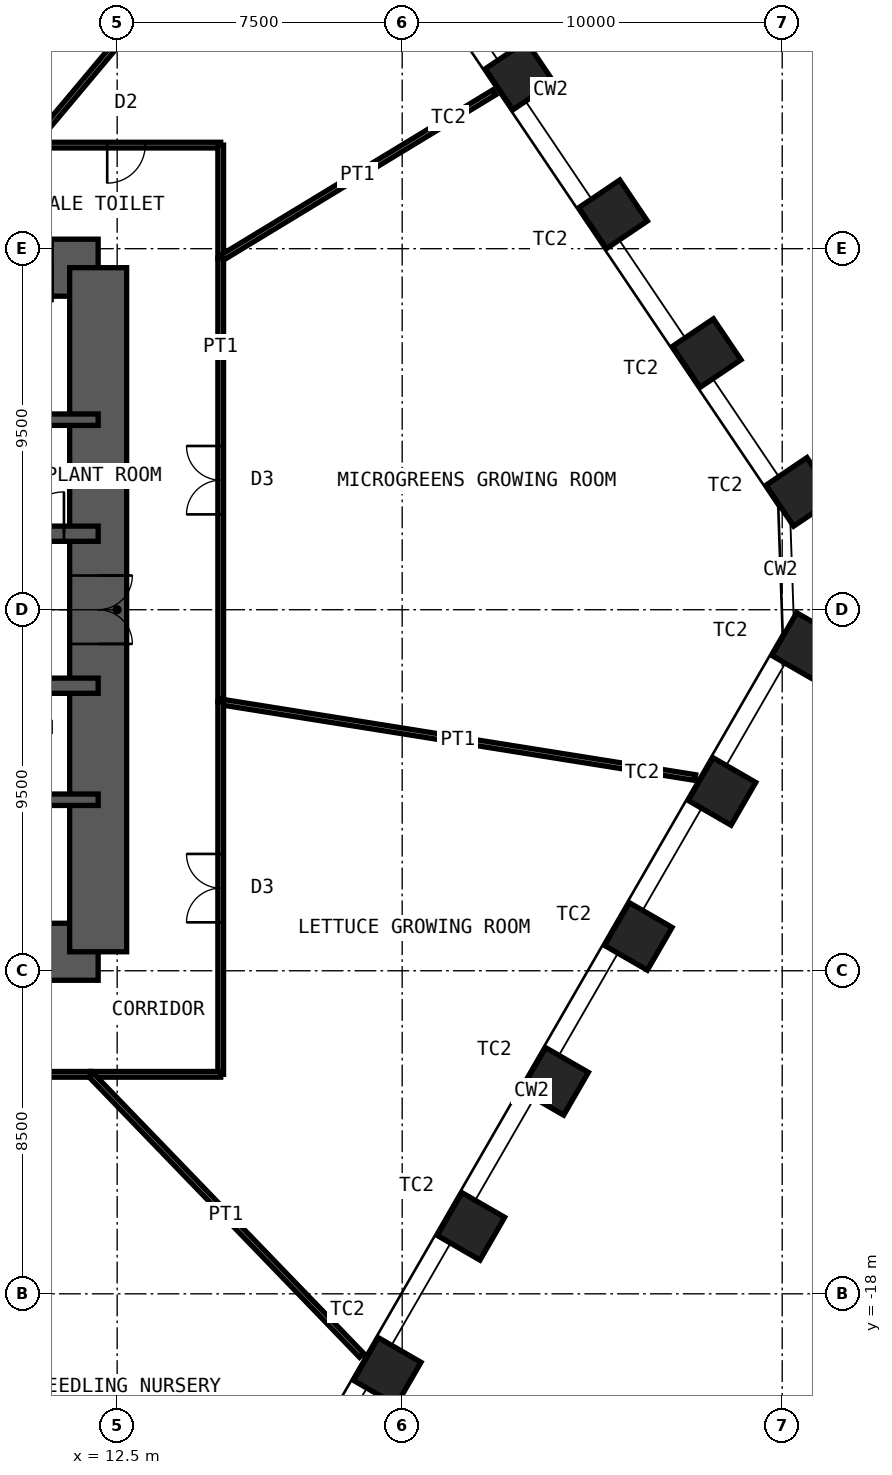
"""IFC4 building model, lengths in metres.
Left out: names, types, materials, properties, quantities, classifications, styles, units other than length and angle.
Written with IfcOpenShell. Run it as: python <this file> out.ifc"""

import sys

from ifc_helpers import new_model, si_unit, direction, frame, frame_2d, origin, origin_2d, place, context, subcontext, project, spatial, rectangle, hollow_rectangle, extrude, element, fill, save


model = new_model("IFC4")
c1 = context("Model", 3, precision=1e-05, world=origin(), true_north=direction((0.0, 1.0)))
c2 = subcontext(c1, "Body", "Model", "MODEL_VIEW")
j1 = project(units=[si_unit("LENGTHUNIT", "METRE"), si_unit("PLANEANGLEUNIT", "RADIAN")], contexts=[c1])
p1 = place(None, origin())
s1 = spatial("IfcSite", under=j1, at=p1, CompositionType="ELEMENT")
p2 = place(p1, origin())
s2 = spatial("IfcBuilding", under=s1, at=p2, CompositionType="ELEMENT")
p3 = place(p2, frame((0.0, 0.0, 87.0)))
s3 = spatial("IfcBuildingStorey", under=s2, at=p3, CompositionType="ELEMENT", Elevation=87.0)
for number, where, z_axis, x_axis in (
    (1, (23.087, 14.056, 0.0), (0.0, 0.0, 1.0), (-0.559, 0.829, 0.0)),
    (2, (25.55, 10.404, 0.0), (0.0, 0.0, 1.0), (-0.559, 0.829, 0.0)),
    (3, (28.013, 6.752, 0.0), (0.0, 0.0, 1.0), (-0.559, 0.829, 0.0)),
    (4, (30.476, 3.101, 0.0), (0.0, 0.0, 1.0), (-0.559, 0.829, 0.0)),
    (5, (30.618, -0.967, 0.0), (0.0, 0.0, 1.0), (0.5, 0.866, 0.0)),
    (6, (28.416, -4.782, 0.0), (0.0, 0.0, 1.0), (0.5, 0.866, 0.0)),
    (7, (26.214, -8.596, 0.0), (0.0, 0.0, 1.0), (0.5, 0.866, 0.0)),
    (8, (24.011, -12.411, 0.0), (0.0, 0.0, 1.0), (0.5, 0.866, 0.0)),
    (9, (21.809, -16.225, 0.0), (0.0, 0.0, 1.0), (0.5, 0.866, 0.0)),
    (10, (19.607, -20.04, 0.0), (0.0, 0.0, 1.0), (0.5, 0.866, 0.0)),
):
    element("IfcColumn", number, at=place(p3, frame(where, z_axis=z_axis, x_axis=x_axis)), inside=s3, PredefinedType="COLUMN", context=c2, shape_type="SweptSolid", body=[
        extrude(hollow_rectangle(XDim=1.3, YDim=1.3, WallThickness=0.1, at=origin_2d()), origin(), (0.0, 0.0, 1.0), 5.0),
    ])
p4 = place(p3, frame((-12.0, 9.0, 0.0), z_axis=(0.0, 0.0, 1.0), x_axis=(1.0, 0.0, 0.0)))
e11 = element("IfcWall", 11, at=p4, inside=s3, PredefinedType="SHEAR", context=c2, shape_type="SweptSolid", body=[
    extrude(rectangle(XDim=24.0, YDim=1.5, at=frame_2d((12.0, 0.0))), origin(), (0.0, 0.0, 1.0), 5.0),
])
p5 = place(p4, frame((10.4, 0.0, 0.0)))
e12 = element("IfcOpeningElement", 12, at=p5, cuts=e11, PredefinedType="OPENING", context=c2, shape_type="SweptSolid", body=[
    extrude(rectangle(XDim=1.0, YDim=2.1, at=frame_2d((0.5, 1.05))), frame((0.0, 0.76, 0.0), z_axis=(0.0, -1.0, 0.0), x_axis=(1.0, 0.0, 0.0)), (0.0, 0.0, 1.0), 1.52),
])
p6 = place(p4, frame((17.6, 0.0, 0.0)))
e13 = element("IfcOpeningElement", 13, at=p6, cuts=e11, PredefinedType="OPENING", context=c2, shape_type="SweptSolid", body=[
    extrude(rectangle(XDim=0.9, YDim=2.1, at=frame_2d((0.45, 1.05))), frame((0.0, 0.76, 0.0), z_axis=(0.0, -1.0, 0.0), x_axis=(1.0, 0.0, 0.0)), (0.0, 0.0, 1.0), 1.52),
])
p7 = place(p4, frame((21.9, 0.0, 0.0)))
e14 = element("IfcOpeningElement", 14, at=p7, cuts=e11, PredefinedType="OPENING", context=c2, shape_type="SweptSolid", body=[
    extrude(rectangle(XDim=0.9, YDim=2.1, at=frame_2d((0.45, 1.05))), frame((0.0, 0.76, 0.0), z_axis=(0.0, -1.0, 0.0), x_axis=(1.0, 0.0, 0.0)), (0.0, 0.0, 1.0), 1.52),
])
p8 = place(p3, frame((-12.0, -9.0, 0.0), z_axis=(0.0, 0.0, 1.0), x_axis=(1.0, 0.0, 0.0)))
e15 = element("IfcWall", 15, at=p8, inside=s3, PredefinedType="SHEAR", context=c2, shape_type="SweptSolid", body=[
    extrude(rectangle(XDim=24.0, YDim=1.5, at=frame_2d((12.0, 0.0))), origin(), (0.0, 0.0, 1.0), 5.0),
])
p9 = place(p8, frame((1.35, 0.0, 0.0)))
e16 = element("IfcOpeningElement", 16, at=p9, cuts=e15, PredefinedType="OPENING", context=c2, shape_type="SweptSolid", body=[
    extrude(rectangle(XDim=1.0, YDim=2.1, at=frame_2d((0.5, 1.05))), frame((0.0, 0.76, 0.0), z_axis=(0.0, -1.0, 0.0), x_axis=(1.0, 0.0, 0.0)), (0.0, 0.0, 1.0), 1.52),
])
p10 = place(p8, frame((5.325, 0.0, 0.0)))
e17 = element("IfcOpeningElement", 17, at=p10, cuts=e15, PredefinedType="OPENING", context=c2, shape_type="SweptSolid", body=[
    extrude(rectangle(XDim=1.15, YDim=2.1, at=frame_2d((0.575, 1.05))), frame((0.0, 0.76, 0.0), z_axis=(0.0, -1.0, 0.0), x_axis=(1.0, 0.0, 0.0)), (0.0, 0.0, 1.0), 1.52),
])
p11 = place(p8, frame((12.6, 0.0, 0.0)))
e18 = element("IfcOpeningElement", 18, at=p11, cuts=e15, PredefinedType="OPENING", context=c2, shape_type="SweptSolid", body=[
    extrude(rectangle(XDim=1.0, YDim=2.1, at=frame_2d((0.5, 1.05))), frame((0.0, 0.76, 0.0), z_axis=(0.0, -1.0, 0.0), x_axis=(1.0, 0.0, 0.0)), (0.0, 0.0, 1.0), 1.52),
])
p12 = place(p3, frame((12.0, -9.0, 0.0), z_axis=(0.0, 0.0, 1.0), x_axis=(0.0, 1.0, 0.0)))
e19 = element("IfcWall", 19, at=p12, inside=s3, PredefinedType="SHEAR", context=c2, shape_type="SweptSolid", body=[
    extrude(rectangle(XDim=18.0, YDim=1.5, at=frame_2d((9.0, 0.0))), origin(), (0.0, 0.0, 1.0), 5.0),
])
p13 = place(p12, frame((8.1, 0.0, 0.0)))
e20 = element("IfcOpeningElement", 20, at=p13, cuts=e19, PredefinedType="OPENING", context=c2, shape_type="SweptSolid", body=[
    extrude(rectangle(XDim=1.8, YDim=2.1, at=frame_2d((0.9, 1.05))), frame((0.0, 0.76, 0.0), z_axis=(0.0, -1.0, 0.0), x_axis=(1.0, 0.0, 0.0)), (0.0, 0.0, 1.0), 1.52),
])
p14 = place(p3, frame((-12.0, 5.0, 0.0), z_axis=(0.0, 0.0, 1.0), x_axis=(1.0, 0.0, 0.0)))
e21 = element("IfcWall", 21, at=p14, inside=s3, PredefinedType="SHEAR", context=c2, shape_type="SweptSolid", body=[
    extrude(rectangle(XDim=24.0, YDim=0.3, at=frame_2d((12.0, 0.0))), origin(), (0.0, 0.0, 1.0), 5.0),
])
p15 = place(p3, frame((-12.0, 2.0, 0.0), z_axis=(0.0, 0.0, 1.0), x_axis=(1.0, 0.0, 0.0)))
e22 = element("IfcWall", 22, at=p15, inside=s3, PredefinedType="SHEAR", context=c2, shape_type="SweptSolid", body=[
    extrude(rectangle(XDim=24.0, YDim=0.4, at=frame_2d((12.0, 0.0))), origin(), (0.0, 0.0, 1.0), 5.0),
])
p16 = place(p15, frame((2.4, 0.0, 0.0)))
e23 = element("IfcOpeningElement", 23, at=p16, cuts=e22, PredefinedType="OPENING", context=c2, shape_type="SweptSolid", body=[
    extrude(rectangle(XDim=1.1, YDim=2.1, at=frame_2d((0.55, 1.05))), frame((0.0, 0.21, 0.0), z_axis=(0.0, -1.0, 0.0), x_axis=(1.0, 0.0, 0.0)), (0.0, 0.0, 1.0), 0.42),
])
p17 = place(p15, frame((22.0, 0.0, 0.0)))
e24 = element("IfcOpeningElement", 24, at=p17, cuts=e22, PredefinedType="OPENING", context=c2, shape_type="SweptSolid", body=[
    extrude(rectangle(XDim=1.1, YDim=2.1, at=frame_2d((0.55, 1.05))), frame((0.0, 0.21, 0.0), z_axis=(0.0, -1.0, 0.0), x_axis=(1.0, 0.0, 0.0)), (0.0, 0.0, 1.0), 0.42),
])
p18 = place(p15, frame((10.15, 0.0, 0.0)))
e25 = element("IfcOpeningElement", 25, at=p18, cuts=e22, PredefinedType="OPENING", context=c2, shape_type="SweptSolid", body=[
    extrude(rectangle(XDim=1.0, YDim=2.1, at=frame_2d((0.5, 1.05))), frame((0.0, 0.21, 0.0), z_axis=(0.0, -1.0, 0.0), x_axis=(1.0, 0.0, 0.0)), (0.0, 0.0, 1.0), 0.42),
])
p19 = place(p15, frame((6.7, 0.0, 0.0)))
e26 = element("IfcOpeningElement", 26, at=p19, cuts=e22, PredefinedType="OPENING", context=c2, shape_type="SweptSolid", body=[
    extrude(rectangle(XDim=1.4, YDim=2.4, at=frame_2d((0.7, 1.2))), frame((0.0, 0.21, 0.0), z_axis=(0.0, -1.0, 0.0), x_axis=(1.0, 0.0, 0.0)), (0.0, 0.0, 1.0), 0.42),
])
p20 = place(p15, frame((13.35, 0.0, 0.0)))
e27 = element("IfcOpeningElement", 27, at=p20, cuts=e22, PredefinedType="OPENING", context=c2, shape_type="SweptSolid", body=[
    extrude(rectangle(XDim=1.1, YDim=2.4, at=frame_2d((0.55, 1.2))), frame((0.0, 0.21, 0.0), z_axis=(0.0, -1.0, 0.0), x_axis=(1.0, 0.0, 0.0)), (0.0, 0.0, 1.0), 0.42),
])
p21 = place(p15, frame((16.15, 0.0, 0.0)))
e28 = element("IfcOpeningElement", 28, at=p21, cuts=e22, PredefinedType="OPENING", context=c2, shape_type="SweptSolid", body=[
    extrude(rectangle(XDim=1.1, YDim=2.4, at=frame_2d((0.55, 1.2))), frame((0.0, 0.21, 0.0), z_axis=(0.0, -1.0, 0.0), x_axis=(1.0, 0.0, 0.0)), (0.0, 0.0, 1.0), 0.42),
])
p22 = place(p15, frame((18.95, 0.0, 0.0)))
e29 = element("IfcOpeningElement", 29, at=p22, cuts=e22, PredefinedType="OPENING", context=c2, shape_type="SweptSolid", body=[
    extrude(rectangle(XDim=1.1, YDim=2.4, at=frame_2d((0.55, 1.2))), frame((0.0, 0.21, 0.0), z_axis=(0.0, -1.0, 0.0), x_axis=(1.0, 0.0, 0.0)), (0.0, 0.0, 1.0), 0.42),
])
p23 = place(p3, frame((-12.0, -2.0, 0.0), z_axis=(0.0, 0.0, 1.0), x_axis=(1.0, 0.0, 0.0)))
e30 = element("IfcWall", 30, at=p23, inside=s3, PredefinedType="SHEAR", context=c2, shape_type="SweptSolid", body=[
    extrude(rectangle(XDim=24.0, YDim=0.4, at=frame_2d((12.0, 0.0))), origin(), (0.0, 0.0, 1.0), 5.0),
])
p24 = place(p23, frame((1.1, 0.0, 0.0)))
e31 = element("IfcOpeningElement", 31, at=p24, cuts=e30, PredefinedType="OPENING", context=c2, shape_type="SweptSolid", body=[
    extrude(rectangle(XDim=1.1, YDim=2.1, at=frame_2d((0.55, 1.05))), frame((0.0, 0.21, 0.0), z_axis=(0.0, -1.0, 0.0), x_axis=(1.0, 0.0, 0.0)), (0.0, 0.0, 1.0), 0.42),
])
p25 = place(p23, frame((13.55, 0.0, 0.0)))
e32 = element("IfcOpeningElement", 32, at=p25, cuts=e30, PredefinedType="OPENING", context=c2, shape_type="SweptSolid", body=[
    extrude(rectangle(XDim=1.1, YDim=2.1, at=frame_2d((0.55, 1.05))), frame((0.0, 0.21, 0.0), z_axis=(0.0, -1.0, 0.0), x_axis=(1.0, 0.0, 0.0)), (0.0, 0.0, 1.0), 0.42),
])
p26 = place(p23, frame((20.7, 0.0, 0.0)))
e33 = element("IfcOpeningElement", 33, at=p26, cuts=e30, PredefinedType="OPENING", context=c2, shape_type="SweptSolid", body=[
    extrude(rectangle(XDim=1.1, YDim=2.1, at=frame_2d((0.55, 1.05))), frame((0.0, 0.21, 0.0), z_axis=(0.0, -1.0, 0.0), x_axis=(1.0, 0.0, 0.0)), (0.0, 0.0, 1.0), 0.42),
])
p27 = place(p3, frame((-12.0, -5.0, 0.0), z_axis=(0.0, 0.0, 1.0), x_axis=(1.0, 0.0, 0.0)))
e34 = element("IfcWall", 34, at=p27, inside=s3, PredefinedType="SHEAR", context=c2, shape_type="SweptSolid", body=[
    extrude(rectangle(XDim=24.0, YDim=0.3, at=frame_2d((12.0, 0.0))), origin(), (0.0, 0.0, 1.0), 5.0),
])
p28 = place(p3, frame((17.517, 20.891, 0.0), z_axis=(0.0, 0.0, 1.0), x_axis=(-0.642521498084, -0.766267658524, 0.0)))
e35 = element("IfcWall", 35, at=p28, inside=s3, PredefinedType="PARTITIONING", context=c2, shape_type="SweptSolid", body=[
    extrude(rectangle(XDim=11.309, YDim=0.15, at=frame_2d((5.654, 0.0))), origin(), (0.0, 0.0, 1.0), 3.7),
])
p29 = place(p3, frame((10.25, 12.225, 0.0), z_axis=(0.0, 0.0, 1.0), x_axis=(1.0, 0.0, 0.0)))
e36 = element("IfcWall", 36, at=p29, inside=s3, PredefinedType="PARTITIONING", context=c2, shape_type="SweptSolid", body=[
    extrude(rectangle(XDim=4.975, YDim=0.15, at=frame_2d((2.487, 0.0))), origin(), (0.0, 0.0, 1.0), 4.8),
])
p30 = place(p29, frame((1.987, 0.0, 0.0)))
e37 = element("IfcOpeningElement", 37, at=p30, cuts=e36, PredefinedType="OPENING", context=c2, shape_type="SweptSolid", body=[
    extrude(rectangle(XDim=1.0, YDim=2.4, at=frame_2d((0.5, 1.2))), frame((0.0, 0.085, 0.0), z_axis=(0.0, -1.0, 0.0), x_axis=(1.0, 0.0, 0.0)), (0.0, 0.0, 1.0), 0.17),
])
p31 = place(p3, frame((15.225, 12.225, 0.0), z_axis=(0.0, 0.0, 1.0), x_axis=(0.0, -1.0, 0.0)))
e38 = element("IfcWall", 38, at=p31, inside=s3, PredefinedType="PARTITIONING", context=c2, shape_type="SweptSolid", body=[
    extrude(rectangle(XDim=2.982, YDim=0.15, at=frame_2d((1.491, 0.0))), origin(), (0.0, 0.0, 1.0), 4.8),
])
p32 = place(p3, frame((22.421, 13.612, 0.0), z_axis=(0.0, 0.0, 1.0), x_axis=(-0.854789353023, -0.518975107263, 0.0)))
e39 = element("IfcWall", 39, at=p32, inside=s3, PredefinedType="PARTITIONING", context=c2, shape_type="SweptSolid", body=[
    extrude(rectangle(XDim=8.419, YDim=0.15, at=frame_2d((4.209, 0.0))), origin(), (0.0, 0.0, 1.0), 3.7),
])
p33 = place(p3, frame((15.225, 9.243, 0.0), z_axis=(0.0, 0.0, 1.0), x_axis=(0.0, -1.0, 0.0)))
e40 = element("IfcWall", 40, at=p33, inside=s3, PredefinedType="PARTITIONING", context=c2, shape_type="SweptSolid", body=[
    extrude(rectangle(XDim=11.669, YDim=0.15, at=frame_2d((5.835, 0.0))), origin(), (0.0, 0.0, 1.0), 4.8),
])
p34 = place(p33, frame((4.935, 0.0, 0.0)))
e41 = element("IfcOpeningElement", 41, at=p34, cuts=e40, PredefinedType="OPENING", context=c2, shape_type="SweptSolid", body=[
    extrude(rectangle(XDim=1.8, YDim=2.4, at=frame_2d((0.9, 1.2))), frame((0.0, 0.085, 0.0), z_axis=(0.0, -1.0, 0.0), x_axis=(1.0, 0.0, 0.0)), (0.0, 0.0, 1.0), 0.17),
])
p35 = place(p3, frame((27.711, -4.416, 0.0), z_axis=(0.0, 0.0, 1.0), x_axis=(-0.987539485036, 0.157371425279, 0.0)))
e42 = element("IfcWall", 42, at=p35, inside=s3, PredefinedType="PARTITIONING", context=c2, shape_type="SweptSolid", body=[
    extrude(rectangle(XDim=12.644, YDim=0.15, at=frame_2d((6.322, 0.0))), origin(), (0.0, 0.0, 1.0), 3.7),
])
p36 = place(p3, frame((15.225, -2.426, 0.0), z_axis=(0.0, 0.0, 1.0), x_axis=(0.0, -1.0, 0.0)))
e43 = element("IfcWall", 43, at=p36, inside=s3, PredefinedType="PARTITIONING", context=c2, shape_type="SweptSolid", body=[
    extrude(rectangle(XDim=9.799, YDim=0.15, at=frame_2d((4.899, 0.0))), origin(), (0.0, 0.0, 1.0), 4.8),
])
p37 = place(p36, frame((3.999, 0.0, 0.0)))
e44 = element("IfcOpeningElement", 44, at=p37, cuts=e43, PredefinedType="OPENING", context=c2, shape_type="SweptSolid", body=[
    extrude(rectangle(XDim=1.8, YDim=2.4, at=frame_2d((0.9, 1.2))), frame((0.0, 0.085, 0.0), z_axis=(0.0, -1.0, 0.0), x_axis=(1.0, 0.0, 0.0)), (0.0, 0.0, 1.0), 0.17),
])
p38 = place(p3, frame((15.225, -12.225, 0.0), z_axis=(0.0, 0.0, 1.0), x_axis=(-1.0, 0.0, 0.0)))
e45 = element("IfcWall", 45, at=p38, inside=s3, PredefinedType="PARTITIONING", context=c2, shape_type="SweptSolid", body=[
    extrude(rectangle(XDim=3.428, YDim=0.15, at=frame_2d((1.714, 0.0))), origin(), (0.0, 0.0, 1.0), 4.8),
])
p39 = place(p3, frame((18.931, -19.618, 0.0), z_axis=(0.0, 0.0, 1.0), x_axis=(-0.694399830455, 0.719589379761, 0.0)))
e46 = element("IfcWall", 46, at=p39, inside=s3, PredefinedType="PARTITIONING", context=c2, shape_type="SweptSolid", body=[
    extrude(rectangle(XDim=10.274, YDim=0.15, at=frame_2d((5.137, 0.0))), origin(), (0.0, 0.0, 1.0), 3.7),
])
p40 = place(p3, frame((11.797, -12.225, 0.0), z_axis=(0.0, 0.0, 1.0), x_axis=(-1.0, 0.0, 0.0)))
e47 = element("IfcWall", 47, at=p40, inside=s3, PredefinedType="PARTITIONING", context=c2, shape_type="SweptSolid", body=[
    extrude(rectangle(XDim=7.343, YDim=0.15, at=frame_2d((3.671, 0.0))), origin(), (0.0, 0.0, 1.0), 4.8),
])
p41 = place(p40, frame((3.171, 0.0, 0.0)))
e48 = element("IfcOpeningElement", 48, at=p41, cuts=e47, PredefinedType="OPENING", context=c2, shape_type="SweptSolid", body=[
    extrude(rectangle(XDim=1.0, YDim=2.4, at=frame_2d((0.5, 1.2))), frame((0.0, 0.085, 0.0), z_axis=(0.0, -1.0, 0.0), x_axis=(1.0, 0.0, 0.0)), (0.0, 0.0, 1.0), 0.17),
])
p42 = place(p7, origin())
e49 = element("IfcDoor", 49, at=p42, inside=s3, OperationType="SINGLE_SWING_RIGHT", PredefinedType="DOOR", context=c2, shape_type="SweptSolid", body=[
    extrude(rectangle(XDim=0.9, YDim=2.1, at=frame_2d((0.45, 1.05))), frame((0.0, 0.025, 0.0), z_axis=(0.0, -1.0, 0.0), x_axis=(1.0, 0.0, 0.0)), (0.0, 0.0, 1.0), 0.05),
])
fill(e14, e49)
p43 = place(p17, origin())
e50 = element("IfcDoor", 50, at=p43, inside=s3, OperationType="SINGLE_SWING_LEFT", PredefinedType="DOOR", context=c2, shape_type="SweptSolid", body=[
    extrude(rectangle(XDim=1.1, YDim=2.1, at=frame_2d((0.55, 1.05))), frame((0.0, 0.025, 0.0), z_axis=(0.0, -1.0, 0.0), x_axis=(1.0, 0.0, 0.0)), (0.0, 0.0, 1.0), 0.05),
])
fill(e24, e50)
p44 = place(p13, origin())
e51 = element("IfcDoor", 51, at=p44, inside=s3, OperationType="DOUBLE_DOOR_DOUBLE_SWING", PredefinedType="DOOR", context=c2, shape_type="SweptSolid", body=[
    extrude(rectangle(XDim=1.8, YDim=2.1, at=frame_2d((0.9, 1.05))), frame((0.0, 0.025, 0.0), z_axis=(0.0, -1.0, 0.0), x_axis=(1.0, 0.0, 0.0)), (0.0, 0.0, 1.0), 0.05),
])
fill(e20, e51)
p45 = place(p30, origin())
e52 = element("IfcDoor", 52, at=p45, inside=s3, OperationType="SINGLE_SWING_LEFT", PredefinedType="DOOR", context=c2, shape_type="SweptSolid", body=[
    extrude(rectangle(XDim=1.0, YDim=2.4, at=frame_2d((0.5, 1.2))), frame((0.0, 0.025, 0.0), z_axis=(0.0, -1.0, 0.0), x_axis=(1.0, 0.0, 0.0)), (0.0, 0.0, 1.0), 0.05),
])
fill(e37, e52)
p46 = place(p34, origin())
e53 = element("IfcDoor", 53, at=p46, inside=s3, OperationType="DOUBLE_DOOR_DOUBLE_SWING", PredefinedType="DOOR", context=c2, shape_type="SweptSolid", body=[
    extrude(rectangle(XDim=1.8, YDim=2.4, at=frame_2d((0.9, 1.2))), frame((0.0, 0.025, 0.0), z_axis=(0.0, -1.0, 0.0), x_axis=(1.0, 0.0, 0.0)), (0.0, 0.0, 1.0), 0.05),
])
fill(e41, e53)
p47 = place(p37, origin())
e54 = element("IfcDoor", 54, at=p47, inside=s3, OperationType="DOUBLE_DOOR_DOUBLE_SWING", PredefinedType="DOOR", context=c2, shape_type="SweptSolid", body=[
    extrude(rectangle(XDim=1.8, YDim=2.4, at=frame_2d((0.9, 1.2))), frame((0.0, 0.025, 0.0), z_axis=(0.0, -1.0, 0.0), x_axis=(1.0, 0.0, 0.0)), (0.0, 0.0, 1.0), 0.05),
])
fill(e44, e54)
save(model, sys.argv[1])
